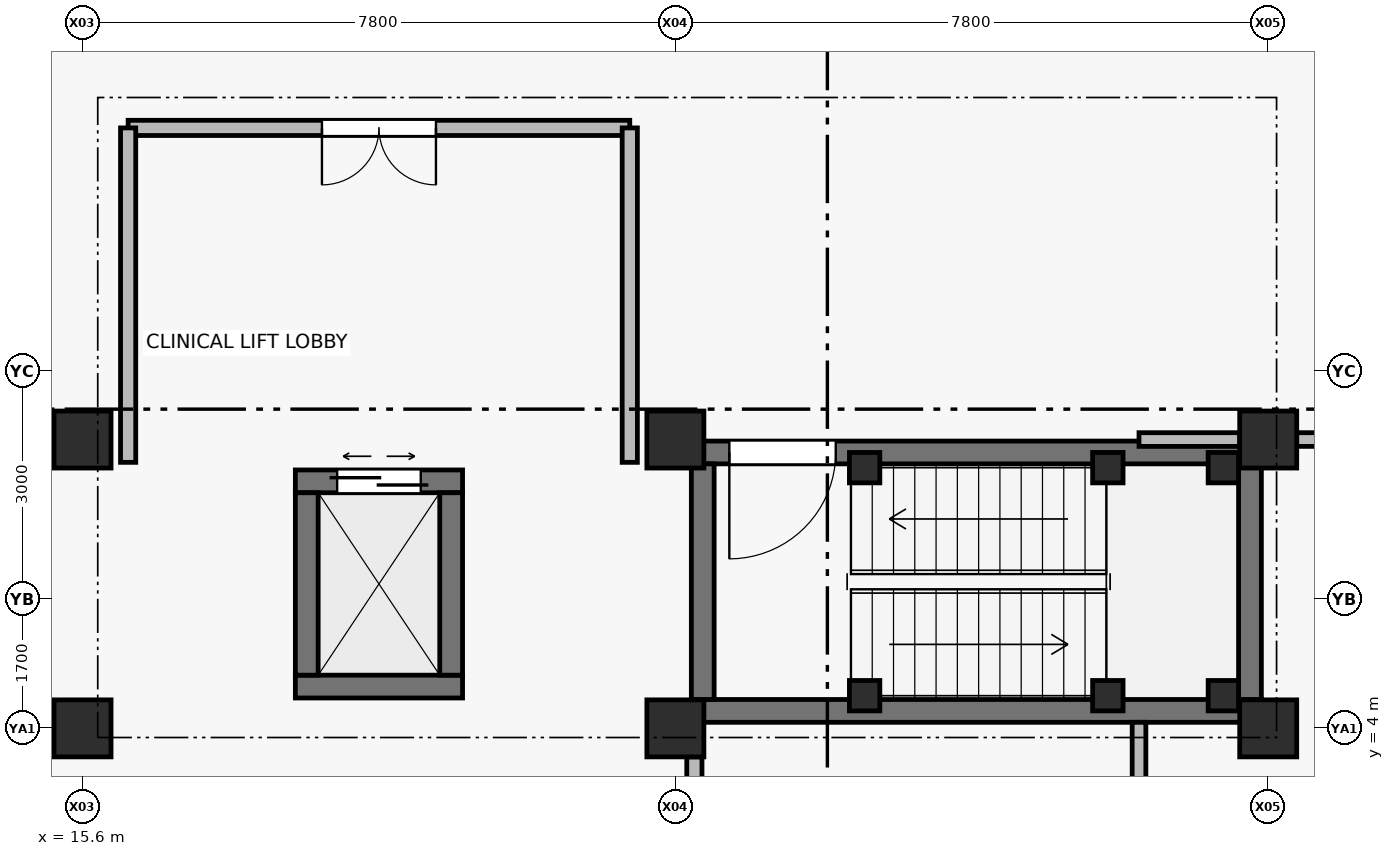
"""IFC4 building model, lengths in metres.
Left out: names, types, materials, properties, quantities, classifications, styles, units other than length and angle.
Written with IfcOpenShell. Run it as: python <this file> out.ifc"""

import sys

from ifc_helpers import new_model, si_unit, direction, frame, frame_2d, origin, origin_2d, place, context, subcontext, project, spatial, rectangle, extrude, element, fill, save


model = new_model("IFC4")
c1 = context("Model", 3, precision=1e-05, world=origin(), true_north=direction((0.0, 1.0)))
c2 = subcontext(c1, "Body", "Model", "MODEL_VIEW")
j1 = project(units=[si_unit("LENGTHUNIT", "METRE"), si_unit("PLANEANGLEUNIT", "RADIAN")], contexts=[c1])
p1 = place(None, origin())
s1 = spatial("IfcSite", under=j1, at=p1, CompositionType="ELEMENT")
p2 = place(p1, origin())
s2 = spatial("IfcBuilding", under=s1, at=p2, CompositionType="ELEMENT")
p3 = place(p2, frame((0.0, 0.0, -4.5)))
s3 = spatial("IfcBuildingStorey", under=s2, at=p3, CompositionType="ELEMENT", Elevation=-4.5)
for number, where, z_axis, x_axis in (
    (1, (15.6, 4.0, 0.0), (0.0, 0.0, 1.0), (1.0, 0.0, 0.0)),
    (2, (15.6, 7.8, 0.0), (0.0, 0.0, 1.0), (1.0, 0.0, 0.0)),
    (3, (23.4, 4.0, 0.0), (0.0, 0.0, 1.0), (1.0, 0.0, 0.0)),
    (4, (23.4, 7.8, 0.0), (0.0, 0.0, 1.0), (1.0, 0.0, 0.0)),
    (5, (31.2, 4.0, 0.0), (0.0, 0.0, 1.0), (1.0, 0.0, 0.0)),
    (6, (31.2, 7.8, 0.0), (0.0, 0.0, 1.0), (1.0, 0.0, 0.0)),
):
    element("IfcColumn", number, at=place(p3, frame(where, z_axis=z_axis, x_axis=x_axis)), inside=s3, PredefinedType="COLUMN", context=c2, shape_type="SweptSolid", body=[
        extrude(rectangle(XDim=0.75, YDim=0.75, at=origin_2d()), origin(), (0.0, 0.0, 1.0), 4.5),
    ])
for number, where, z_axis, x_axis in (
    (7, (25.89, 4.43, 0.0), (0.0, 0.0, 1.0), (1.0, 0.0, 0.0)),
    (8, (25.89, 7.43, 0.0), (0.0, 0.0, 1.0), (1.0, 0.0, 0.0)),
    (9, (29.09, 4.43, 0.0), (0.0, 0.0, 1.0), (1.0, 0.0, 0.0)),
    (10, (29.09, 7.43, 0.0), (0.0, 0.0, 1.0), (1.0, 0.0, 0.0)),
    (11, (30.61, 4.43, 0.0), (0.0, 0.0, 1.0), (1.0, 0.0, 0.0)),
    (12, (30.61, 7.43, 0.0), (0.0, 0.0, 1.0), (1.0, 0.0, 0.0)),
):
    element("IfcColumn", number, at=place(p3, frame(where, z_axis=z_axis, x_axis=x_axis)), inside=s3, PredefinedType="COLUMN", context=c2, shape_type="SweptSolid", body=[
        extrude(rectangle(XDim=0.4, YDim=0.4, at=origin_2d()), origin(), (0.0, 0.0, 1.0), 4.5),
    ])
p4 = place(p3, frame((23.61, 4.23, 0.0), z_axis=(0.0, 0.0, 1.0), x_axis=(1.0, 0.0, 0.0)))
e13 = element("IfcWall", 13, at=p4, inside=s3, PredefinedType="SHEAR", context=c2, shape_type="SweptSolid", body=[
    extrude(rectangle(XDim=7.5, YDim=0.3, at=frame_2d((3.75, 0.0))), origin(), (0.0, 0.0, 1.0), 4.2),
])
p5 = place(p3, frame((31.11, 7.63, 0.0), z_axis=(0.0, 0.0, 1.0), x_axis=(-1.0, 0.0, 0.0)))
e14 = element("IfcWall", 14, at=p5, inside=s3, PredefinedType="SHEAR", context=c2, shape_type="SweptSolid", body=[
    extrude(rectangle(XDim=7.5, YDim=0.3, at=frame_2d((3.75, 0.0))), origin(), (0.0, 0.0, 1.0), 4.2),
])
p6 = place(p5, frame((5.6, 0.0, 0.0)))
e15 = element("IfcOpeningElement", 15, at=p6, cuts=e14, PredefinedType="OPENING", context=c2, shape_type="SweptSolid", body=[
    extrude(rectangle(XDim=1.4, YDim=2.2, at=frame_2d((0.7, 1.1))), frame((0.0, 0.16, 0.0), z_axis=(0.0, -1.0, 0.0), x_axis=(1.0, 0.0, 0.0)), (0.0, 0.0, 1.0), 0.32),
])
for number, where, z_axis, x_axis in (
    (16, (23.76, 7.48, 0.0), (0.0, 0.0, 1.0), (0.0, -1.0, 0.0)),
    (17, (30.96, 4.38, 0.0), (0.0, 0.0, 1.0), (0.0, 1.0, 0.0)),
):
    element("IfcWall", number, at=place(p3, frame(where, z_axis=z_axis, x_axis=x_axis)), inside=s3, PredefinedType="SHEAR", context=c2, shape_type="SweptSolid", body=[
        extrude(rectangle(XDim=3.1, YDim=0.3, at=frame_2d((1.55, 0.0))), origin(), (0.0, 0.0, 1.0), 4.2),
    ])
p7 = place(p3, frame((18.4, 4.55, 0.0), z_axis=(0.0, 0.0, 1.0), x_axis=(1.0, 0.0, 0.0)))
e18 = element("IfcWall", 18, at=p7, inside=s3, PredefinedType="SHEAR", context=c2, shape_type="SweptSolid", body=[
    extrude(rectangle(XDim=2.2, YDim=0.3, at=frame_2d((1.1, 0.0))), origin(), (0.0, 0.0, 1.0), 4.2),
])
p8 = place(p3, frame((20.6, 7.25, 0.0), z_axis=(0.0, 0.0, 1.0), x_axis=(-1.0, 0.0, 0.0)))
e19 = element("IfcWall", 19, at=p8, inside=s3, PredefinedType="SHEAR", context=c2, shape_type="SweptSolid", body=[
    extrude(rectangle(XDim=2.2, YDim=0.3, at=frame_2d((1.1, 0.0))), origin(), (0.0, 0.0, 1.0), 4.2),
])
p9 = place(p8, frame((0.55, 0.0, 0.0)))
e20 = element("IfcOpeningElement", 20, at=p9, cuts=e19, PredefinedType="OPENING", context=c2, shape_type="SweptSolid", body=[
    extrude(rectangle(XDim=1.1, YDim=2.2, at=frame_2d((0.55, 1.1))), frame((0.0, 0.16, 0.0), z_axis=(0.0, -1.0, 0.0), x_axis=(1.0, 0.0, 0.0)), (0.0, 0.0, 1.0), 0.32),
])
for number, where, z_axis, x_axis in (
    (21, (18.55, 7.1, 0.0), (0.0, 0.0, 1.0), (0.0, -1.0, 0.0)),
    (22, (20.45, 4.7, 0.0), (0.0, 0.0, 1.0), (0.0, 1.0, 0.0)),
):
    element("IfcWall", number, at=place(p3, frame(where, z_axis=z_axis, x_axis=x_axis)), inside=s3, PredefinedType="SHEAR", context=c2, shape_type="SweptSolid", body=[
        extrude(rectangle(XDim=2.4, YDim=0.3, at=frame_2d((1.2, 0.0))), origin(), (0.0, 0.0, 1.0), 4.2),
    ])
p10 = place(p3, frame((22.8, 11.9, 0.0), z_axis=(0.0, 0.0, 1.0), x_axis=(-1.0, 0.0, 0.0)))
e23 = element("IfcWall", 23, at=p10, inside=s3, PredefinedType="SOLIDWALL", context=c2, shape_type="SweptSolid", body=[
    extrude(rectangle(XDim=6.6, YDim=0.2, at=frame_2d((3.3, 0.0))), origin(), (0.0, 0.0, 1.0), 4.2),
])
p11 = place(p10, frame((2.55, 0.0, 0.0)))
e24 = element("IfcOpeningElement", 24, at=p11, cuts=e23, PredefinedType="OPENING", context=c2, shape_type="SweptSolid", body=[
    extrude(rectangle(XDim=1.5, YDim=2.2, at=frame_2d((0.75, 1.1))), frame((0.0, 0.11, 0.0), z_axis=(0.0, -1.0, 0.0), x_axis=(1.0, 0.0, 0.0)), (0.0, 0.0, 1.0), 0.22),
])
for number, where, z_axis, x_axis in (
    (25, (16.2, 11.9, 0.0), (0.0, 0.0, 1.0), (0.0, -1.0, 0.0)),
    (26, (22.8, 7.5, 0.0), (0.0, 0.0, 1.0), (0.0, 1.0, 0.0)),
):
    element("IfcWall", number, at=place(p3, frame(where, z_axis=z_axis, x_axis=x_axis)), inside=s3, PredefinedType="SOLIDWALL", context=c2, shape_type="SweptSolid", body=[
        extrude(rectangle(XDim=4.4, YDim=0.2, at=frame_2d((2.2, 0.0))), origin(), (0.0, 0.0, 1.0), 4.2),
    ])
p12 = place(p3, frame((15.225, 7.8, 0.0), z_axis=(0.0, 0.0, 1.0), x_axis=(-1.0, 0.0, 0.0)))
e27 = element("IfcWall", 27, at=p12, inside=s3, PredefinedType="SOLIDWALL", context=c2, shape_type="SweptSolid", body=[
    extrude(rectangle(XDim=7.05, YDim=0.2, at=frame_2d((3.525, 0.0))), origin(), (0.0, 0.0, 1.0), 3.7),
])
p13 = place(p3, frame((35.35, 7.8, 0.0), z_axis=(0.0, 0.0, 1.0), x_axis=(-1.0, 0.0, 0.0)))
e28 = element("IfcWall", 28, at=p13, inside=s3, PredefinedType="PARTITIONING", context=c2, shape_type="SweptSolid", body=[
    extrude(rectangle(XDim=3.775, YDim=0.18, at=frame_2d((1.888, 0.0))), origin(), (0.0, 0.0, 1.0), 3.7),
])
p14 = place(p13, frame((1.665, 0.0, 0.0)))
e29 = element("IfcOpeningElement", 29, at=p14, cuts=e28, PredefinedType="OPENING", context=c2, shape_type="SweptSolid", body=[
    extrude(rectangle(XDim=0.92, YDim=2.15, at=frame_2d((0.46, 1.075))), frame((0.0, 0.1, 0.0), z_axis=(0.0, -1.0, 0.0), x_axis=(1.0, 0.0, 0.0)), (0.0, 0.0, 1.0), 0.2),
])
p15 = place(p3, frame((30.825, 7.8, 0.0), z_axis=(0.0, 0.0, 1.0), x_axis=(-1.0, 0.0, 0.0)))
e30 = element("IfcWall", 30, at=p15, inside=s3, PredefinedType="PARTITIONING", context=c2, shape_type="SweptSolid", body=[
    extrude(rectangle(XDim=1.325, YDim=0.18, at=frame_2d((0.663, 0.0))), origin(), (0.0, 0.0, 1.0), 3.7),
])
p16 = place(p3, frame((23.65, 0.375, 0.0), z_axis=(0.0, 0.0, 1.0), x_axis=(0.0, 1.0, 0.0)))
e31 = element("IfcWall", 31, at=p16, inside=s3, PredefinedType="SOLIDWALL", context=c2, shape_type="SweptSolid", body=[
    extrude(rectangle(XDim=3.25, YDim=0.2, at=frame_2d((1.625, 0.0))), origin(), (0.0, 0.0, 1.0), 4.2),
])
p17 = place(p3, frame((29.5, 0.25, 0.0), z_axis=(0.0, 0.0, 1.0), x_axis=(0.0, 1.0, 0.0)))
e32 = element("IfcWall", 32, at=p17, inside=s3, PredefinedType="PARTITIONING", context=c2, shape_type="SweptSolid", body=[
    extrude(rectangle(XDim=3.83, YDim=0.18, at=frame_2d((1.915, 0.0))), origin(), (0.0, 0.0, 1.0), 4.2),
])
p18 = place(p6, origin())
e33 = element("IfcDoor", 33, at=p18, inside=s3, OperationType="SINGLE_SWING_RIGHT", PredefinedType="DOOR", context=c2, shape_type="SweptSolid", body=[
    extrude(rectangle(XDim=1.4, YDim=2.2, at=frame_2d((0.7, 1.1))), frame((0.0, 0.025, 0.0), z_axis=(0.0, -1.0, 0.0), x_axis=(1.0, 0.0, 0.0)), (0.0, 0.0, 1.0), 0.05),
])
fill(e15, e33)
p19 = place(p9, origin())
e34 = element("IfcDoor", 34, at=p19, inside=s3, OperationType="DOUBLE_DOOR_SLIDING", PredefinedType="DOOR", context=c2, shape_type="SweptSolid", body=[
    extrude(rectangle(XDim=1.1, YDim=2.2, at=frame_2d((0.55, 1.1))), frame((0.0, 0.025, 0.0), z_axis=(0.0, -1.0, 0.0), x_axis=(1.0, 0.0, 0.0)), (0.0, 0.0, 1.0), 0.05),
])
fill(e20, e34)
p20 = place(p11, origin())
e35 = element("IfcDoor", 35, at=p20, inside=s3, OperationType="DOUBLE_DOOR_SINGLE_SWING", PredefinedType="DOOR", context=c2, shape_type="SweptSolid", body=[
    extrude(rectangle(XDim=1.5, YDim=2.2, at=frame_2d((0.75, 1.1))), frame((0.0, 0.025, 0.0), z_axis=(0.0, -1.0, 0.0), x_axis=(1.0, 0.0, 0.0)), (0.0, 0.0, 1.0), 0.05),
])
fill(e24, e35)
save(model, sys.argv[1])
